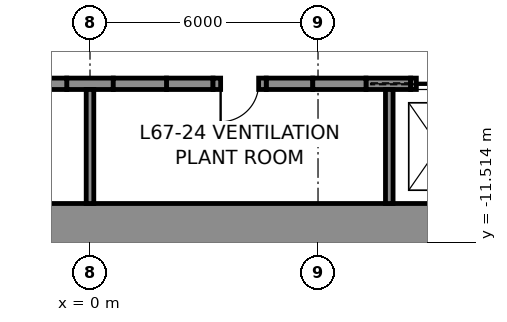
"""IFC4 building model, lengths in metres.
Left out: names, types, materials, properties, quantities, classifications, styles, units other than length and angle.
Written with IfcOpenShell. Run it as: python <this file> out.ifc"""

import sys

from ifc_helpers import new_model, si_unit, direction, frame, frame_2d, origin, place, context, subcontext, project, spatial, rectangle, extrude, element, fill, save


model = new_model("IFC4")
c1 = context("Model", 3, precision=1e-05, world=origin(), true_north=direction((0.0, 1.0)))
c2 = subcontext(c1, "Body", "Model", "MODEL_VIEW")
j1 = project(units=[si_unit("LENGTHUNIT", "METRE"), si_unit("PLANEANGLEUNIT", "RADIAN")], contexts=[c1])
p1 = place(None, origin())
s1 = spatial("IfcSite", under=j1, at=p1, CompositionType="ELEMENT")
p2 = place(p1, origin())
s2 = spatial("IfcBuilding", under=s1, at=p2, CompositionType="ELEMENT")
p3 = place(p2, frame((0.0, 0.0, 297.8)))
s3 = spatial("IfcBuildingStorey", under=s2, at=p3, CompositionType="ELEMENT", Elevation=297.8)
p4 = place(p3, frame((12.0, -11.25, 0.0), z_axis=(0.0, 0.0, 1.0), x_axis=(-1.0, 0.0, 0.0)))
e1 = element("IfcWall", 1, at=p4, inside=s3, PredefinedType="SHEAR", context=c2, shape_type="SweptSolid", body=[
    extrude(rectangle(XDim=24.0, YDim=1.5, at=frame_2d((12.0, 0.0))), origin(), (0.0, 0.0, 1.0), 5.0),
])
for number, where, z_axis, x_axis in (
    (2, (-0.613, -7.35, 0.0), (0.0, 0.0, 1.0), (1.0, 0.0, 0.0)),
    (3, (2.012, -7.35, 0.0), (0.0, 0.0, 1.0), (1.0, 0.0, 0.0)),
    (4, (4.637, -7.35, 0.0), (0.0, 0.0, 1.0), (1.0, 0.0, 0.0)),
):
    element("IfcWall", number, at=place(p3, frame(where, z_axis=z_axis, x_axis=x_axis)), inside=s3, PredefinedType="SHEAR", context=c2, shape_type="SweptSolid", body=[
        extrude(rectangle(XDim=1.225, YDim=0.3, at=frame_2d((0.613, 0.0))), origin(), (0.0, 0.0, 1.0), 5.0),
    ])
p5 = place(p3, frame((7.262, -7.35, 0.0), z_axis=(0.0, 0.0, 1.0), x_axis=(1.0, 0.0, 0.0)))
e5 = element("IfcWall", 5, at=p5, inside=s3, PredefinedType="SHEAR", context=c2, shape_type="SweptSolid", body=[
    extrude(rectangle(XDim=1.175, YDim=0.3, at=frame_2d((0.587, 0.0))), origin(), (0.0, 0.0, 1.0), 5.0),
])
for number, where, z_axis, x_axis in (
    (6, (-2.012, -7.35, 0.0), (0.0, 0.0, 1.0), (1.0, 0.0, 0.0)),
    (7, (0.613, -7.35, 0.0), (0.0, 0.0, 1.0), (1.0, 0.0, 0.0)),
):
    element("IfcWall", number, at=place(p3, frame(where, z_axis=z_axis, x_axis=x_axis)), inside=s3, PredefinedType="PARTITIONING", context=c2, shape_type="SweptSolid", body=[
        extrude(rectangle(XDim=1.4, YDim=0.3, at=frame_2d((0.7, 0.0))), origin(), (0.0, 0.0, 1.0), 5.0),
    ])
p6 = place(p3, frame((3.238, -7.35, 0.0), z_axis=(0.0, 0.0, 1.0), x_axis=(1.0, 0.0, 0.0)))
e8 = element("IfcWall", 8, at=p6, inside=s3, PredefinedType="PARTITIONING", context=c2, shape_type="SweptSolid", body=[
    extrude(rectangle(XDim=1.4, YDim=0.3, at=frame_2d((0.7, 0.0))), origin(), (0.0, 0.0, 1.0), 5.0),
])
p7 = place(p6, frame((0.2, 0.0, 0.0)))
e9 = element("IfcOpeningElement", 9, at=p7, cuts=e8, PredefinedType="OPENING", context=c2, shape_type="SweptSolid", body=[
    extrude(rectangle(XDim=1.0, YDim=2.3, at=frame_2d((0.5, 1.15))), frame((0.0, 0.16, 0.0), z_axis=(0.0, -1.0, 0.0), x_axis=(1.0, 0.0, 0.0)), (0.0, 0.0, 1.0), 0.32),
])
p8 = place(p3, frame((5.863, -7.35, 0.0), z_axis=(0.0, 0.0, 1.0), x_axis=(1.0, 0.0, 0.0)))
e10 = element("IfcWall", 10, at=p8, inside=s3, PredefinedType="PARTITIONING", context=c2, shape_type="SweptSolid", body=[
    extrude(rectangle(XDim=1.4, YDim=0.3, at=frame_2d((0.7, 0.0))), origin(), (0.0, 0.0, 1.0), 5.0),
])
p9 = place(p3, frame((8.438, -7.35, 0.0), z_axis=(0.0, 0.0, 1.0), x_axis=(1.0, 0.0, 0.0)))
e11 = element("IfcWall", 11, at=p9, inside=s3, PredefinedType="PARTITIONING", context=c2, shape_type="SweptSolid", body=[
    extrude(rectangle(XDim=1.5, YDim=0.3, at=frame_2d((0.75, 0.0))), origin(), (0.0, 0.0, 1.0), 5.0),
])
p10 = place(p9, frame((0.15, 0.0, 0.0)))
e12 = element("IfcOpeningElement", 12, at=p10, cuts=e11, PredefinedType="OPENING", context=c2, shape_type="SweptSolid", body=[
    extrude(rectangle(XDim=1.2, YDim=2.3, at=frame_2d((0.6, 1.15))), frame((0.0, 0.16, 0.0), z_axis=(0.0, -1.0, 0.0), x_axis=(1.0, 0.0, 0.0)), (0.0, 0.0, 1.0), 0.32),
])
for number, where, z_axis, x_axis in (
    (13, (0.0, -10.5, 0.0), (0.0, 0.0, 1.0), (0.0, 1.0, 0.0)),
    (14, (7.875, -10.5, 0.0), (0.0, 0.0, 1.0), (0.0, 1.0, 0.0)),
):
    element("IfcWall", number, at=place(p3, frame(where, z_axis=z_axis, x_axis=x_axis)), inside=s3, PredefinedType="PARTITIONING", context=c2, shape_type="SweptSolid", body=[
        extrude(rectangle(XDim=3.0, YDim=0.2, at=frame_2d((1.5, 0.0))), origin(), (0.0, 0.0, 1.0), 5.0),
    ])
p11 = place(p7, frame((1.0, 0.0, 0.0), z_axis=(0.0, 0.0, 1.0), x_axis=(-1.0, 0.0, 0.0)))
e15 = element("IfcDoor", 15, at=p11, inside=s3, OperationType="SINGLE_SWING_RIGHT", PredefinedType="DOOR", context=c2, shape_type="SweptSolid", body=[
    extrude(rectangle(XDim=1.0, YDim=2.3, at=frame_2d((0.5, 1.15))), frame((0.0, 0.025, 0.0), z_axis=(0.0, -1.0, 0.0), x_axis=(1.0, 0.0, 0.0)), (0.0, 0.0, 1.0), 0.05),
])
fill(e9, e15)
p12 = place(p10, origin())
e16 = element("IfcDoor", 16, at=p12, inside=s3, OperationType="SLIDING_TO_LEFT", PredefinedType="DOOR", context=c2, shape_type="SweptSolid", body=[
    extrude(rectangle(XDim=1.2, YDim=2.3, at=frame_2d((0.6, 1.15))), frame((0.0, 0.025, 0.0), z_axis=(0.0, -1.0, 0.0), x_axis=(1.0, 0.0, 0.0)), (0.0, 0.0, 1.0), 0.05),
])
fill(e12, e16)
save(model, sys.argv[1])
